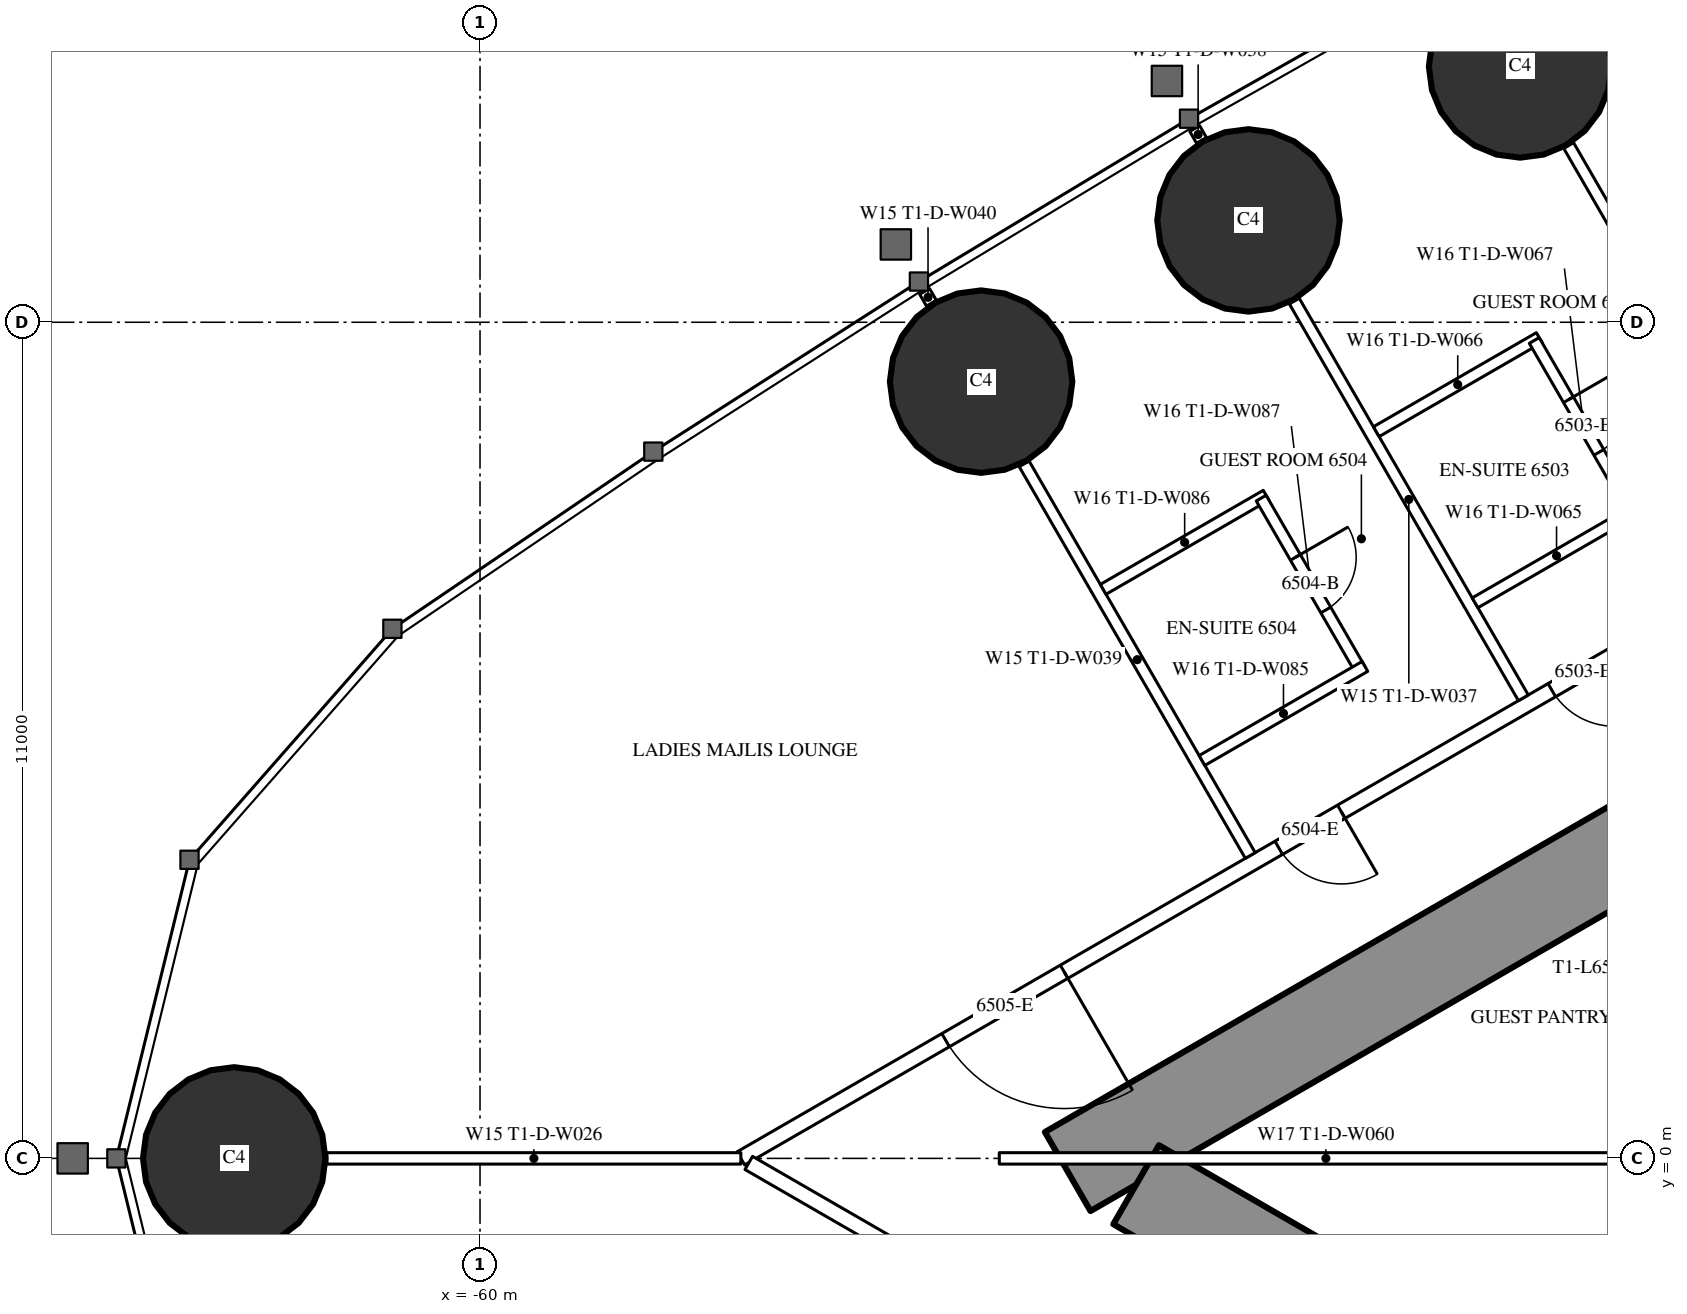
"""IFC4 building model, lengths in metres.
Left out: names, types, materials, properties, quantities, classifications, styles, units other than length and angle.
Written with IfcOpenShell. Run it as: python <this file> out.ifc"""

import sys

from ifc_helpers import new_model, si_unit, direction, frame, frame_2d, origin, origin_2d, place, context, subcontext, project, spatial, rectangle, circle, extrude, element, fill, save


model = new_model("IFC4")
c1 = context("Model", 3, precision=1e-05, world=origin(), true_north=direction((0.0, 1.0)))
c2 = subcontext(c1, "Body", "Model", "MODEL_VIEW")
j1 = project(units=[si_unit("LENGTHUNIT", "METRE"), si_unit("PLANEANGLEUNIT", "RADIAN")], contexts=[c1])
p1 = place(None, origin())
s1 = spatial("IfcSite", under=j1, at=p1, CompositionType="ELEMENT")
p2 = place(p1, origin())
s2 = spatial("IfcBuilding", under=s1, at=p2, CompositionType="ELEMENT")
p3 = place(p2, frame((0.0, 0.0, 244.1)))
s3 = spatial("IfcBuildingStorey", under=s2, at=p3, CompositionType="ELEMENT", Elevation=244.1)
for number, where, z_axis, x_axis in (
    (1, (-63.234, 0.0, 0.0), (0.0, 0.0, 1.0), (1.0, 0.0, 0.0)),
    (2, (-46.317, 14.365, 0.0), (0.0, 0.0, 1.0), (1.0, 0.0, 0.0)),
    (3, (-49.89, 12.34, 0.0), (0.0, 0.0, 1.0), (1.0, 0.0, 0.0)),
    (4, (-53.408, 10.219, 0.0), (0.0, 0.0, 1.0), (1.0, 0.0, 0.0)),
):
    element("IfcColumn", number, at=place(p3, frame(where, z_axis=z_axis, x_axis=x_axis)), inside=s3, PredefinedType="COLUMN", context=c2, shape_type="SweptSolid", body=[
        extrude(circle(Radius=1.2, at=origin_2d()), origin(), (0.0, 0.0, 1.0), 3.6),
    ])
p4 = place(p3, frame((-27.2, 14.3, 0.0), z_axis=(0.0, 0.0, 1.0), x_axis=(-0.866026593062, -0.499997940104, 0.0)))
e5 = element("IfcWall", 5, at=p4, inside=s3, PredefinedType="SHEAR", context=c2, shape_type="SweptSolid", body=[
    extrude(rectangle(XDim=28.946, YDim=1.2, at=frame_2d((14.473, 0.0))), origin(), (0.0, 0.0, 1.0), 3.6),
])
p5 = place(p4, frame((4.6, 0.0, 0.0)))
e6 = element("IfcOpeningElement", 6, at=p5, cuts=e5, PredefinedType="OPENING", context=c2, shape_type="SweptSolid", body=[
    extrude(rectangle(XDim=1.0, YDim=2.2, at=frame_2d((0.5, 1.1))), frame((0.0, 0.61, 0.0), z_axis=(0.0, -1.0, 0.0), x_axis=(1.0, 0.0, 0.0)), (0.0, 0.0, 1.0), 1.22),
])
p6 = place(p4, frame((13.395, 0.0, 0.0)))
e7 = element("IfcOpeningElement", 7, at=p6, cuts=e5, PredefinedType="OPENING", context=c2, shape_type="SweptSolid", body=[
    extrude(rectangle(XDim=1.8, YDim=2.2, at=frame_2d((0.9, 1.1))), frame((0.0, 0.61, 0.0), z_axis=(0.0, -1.0, 0.0), x_axis=(1.0, 0.0, 0.0)), (0.0, 0.0, 1.0), 1.22),
])
p7 = place(p3, frame((-27.2, -14.3, 0.0), z_axis=(0.0, 0.0, 1.0), x_axis=(-0.866024021859, 0.500002393557, 0.0)))
e8 = element("IfcWall", 8, at=p7, inside=s3, PredefinedType="SHEAR", context=c2, shape_type="SweptSolid", body=[
    extrude(rectangle(XDim=27.907, YDim=1.2, at=frame_2d((13.954, 0.0))), origin(), (0.0, 0.0, 1.0), 3.6),
])
p8 = place(p7, frame((4.6, 0.0, 0.0)))
e9 = element("IfcOpeningElement", 9, at=p8, cuts=e8, PredefinedType="OPENING", context=c2, shape_type="SweptSolid", body=[
    extrude(rectangle(XDim=1.0, YDim=2.2, at=frame_2d((0.5, 1.1))), frame((0.0, 0.61, 0.0), z_axis=(0.0, -1.0, 0.0), x_axis=(1.0, 0.0, 0.0)), (0.0, 0.0, 1.0), 1.22),
])
p9 = place(p7, frame((13.395, 0.0, 0.0)))
e10 = element("IfcOpeningElement", 10, at=p9, cuts=e8, PredefinedType="OPENING", context=c2, shape_type="SweptSolid", body=[
    extrude(rectangle(XDim=1.8, YDim=2.2, at=frame_2d((0.9, 1.1))), frame((0.0, 0.61, 0.0), z_axis=(0.0, -1.0, 0.0), x_axis=(1.0, 0.0, 0.0)), (0.0, 0.0, 1.0), 1.22),
])
p10 = place(p3, frame((-28.737, 16.068, 0.0), z_axis=(0.0, 0.0, 1.0), x_axis=(-0.866026057212, -0.499998868229, 0.0)))
e11 = element("IfcWall", 11, at=p10, inside=s3, PredefinedType="PARTITIONING", context=c2, shape_type="SweptSolid", body=[
    extrude(rectangle(XDim=32.137, YDim=0.2, at=frame_2d((16.068, 0.0))), origin(), (0.0, 0.0, 1.0), 3.35),
])
p11 = place(p10, frame((1.08, 0.0, 0.0)))
e12 = element("IfcOpeningElement", 12, at=p11, cuts=e11, PredefinedType="OPENING", context=c2, shape_type="SweptSolid", body=[
    extrude(rectangle(XDim=1.8, YDim=2.04, at=frame_2d((0.9, 1.02))), frame((0.0, 0.11, 0.0), z_axis=(0.0, -1.0, 0.0), x_axis=(1.0, 0.0, 0.0)), (0.0, 0.0, 1.0), 0.22),
])
p12 = place(p10, frame((6.86, 0.0, 0.0)))
e13 = element("IfcOpeningElement", 13, at=p12, cuts=e11, PredefinedType="OPENING", context=c2, shape_type="SweptSolid", body=[
    extrude(rectangle(XDim=1.0, YDim=2.2, at=frame_2d((0.5, 1.1))), frame((0.0, 0.11, 0.0), z_axis=(0.0, -1.0, 0.0), x_axis=(1.0, 0.0, 0.0)), (0.0, 0.0, 1.0), 0.22),
])
p13 = place(p10, frame((18.867, 0.0, 0.0)))
e14 = element("IfcOpeningElement", 14, at=p13, cuts=e11, PredefinedType="OPENING", context=c2, shape_type="SweptSolid", body=[
    extrude(rectangle(XDim=0.95, YDim=2.2, at=frame_2d((0.475, 1.1))), frame((0.0, 0.11, 0.0), z_axis=(0.0, -1.0, 0.0), x_axis=(1.0, 0.0, 0.0)), (0.0, 0.0, 1.0), 0.22),
])
p14 = place(p10, frame((23.015, 0.0, 0.0)))
e15 = element("IfcOpeningElement", 15, at=p14, cuts=e11, PredefinedType="OPENING", context=c2, shape_type="SweptSolid", body=[
    extrude(rectangle(XDim=0.95, YDim=2.2, at=frame_2d((0.475, 1.1))), frame((0.0, 0.11, 0.0), z_axis=(0.0, -1.0, 0.0), x_axis=(1.0, 0.0, 0.0)), (0.0, 0.0, 1.0), 0.22),
])
p15 = place(p10, frame((27.226, 0.0, 0.0)))
e16 = element("IfcOpeningElement", 16, at=p15, cuts=e11, PredefinedType="OPENING", context=c2, shape_type="SweptSolid", body=[
    extrude(rectangle(XDim=1.8, YDim=2.2, at=frame_2d((0.9, 1.1))), frame((0.0, 0.11, 0.0), z_axis=(0.0, -1.0, 0.0), x_axis=(1.0, 0.0, 0.0)), (0.0, 0.0, 1.0), 0.22),
])
p16 = place(p3, frame((-42.68, 8.134, 0.0), z_axis=(0.0, 0.0, 1.0), x_axis=(-0.499984479505, 0.866034364361, 0.0)))
e17 = element("IfcWall", 17, at=p16, inside=s3, PredefinedType="PARTITIONING", context=c2, shape_type="SweptSolid", body=[
    extrude(rectangle(XDim=5.995, YDim=0.15, at=frame_2d((2.998, 0.0))), origin(), (0.0, 0.0, 1.0), 2.45),
])
p17 = place(p3, frame((-46.274, 6.059, 0.0), z_axis=(0.0, 0.0, 1.0), x_axis=(-0.500020471368, 0.866013584312, 0.0)))
e18 = element("IfcWall", 18, at=p17, inside=s3, PredefinedType="PARTITIONING", context=c2, shape_type="SweptSolid", body=[
    extrude(rectangle(XDim=6.028, YDim=0.15, at=frame_2d((3.014, 0.0))), origin(), (0.0, 0.0, 1.0), 2.45),
])
p18 = place(p3, frame((-50.508, 13.392, 0.0), z_axis=(0.0, 0.0, 1.0), x_axis=(-0.499644091975, 0.866230789891, 0.0)))
e19 = element("IfcWall", 19, at=p18, inside=s3, PredefinedType="PARTITIONING", context=c2, shape_type="SweptSolid", body=[
    extrude(rectangle(XDim=0.18, YDim=0.15, at=frame_2d((0.09, 0.0))), origin(), (0.0, 0.0, 1.0), 2.45),
])
p19 = place(p3, frame((-49.866, 3.985, 0.0), z_axis=(0.0, 0.0, 1.0), x_axis=(-0.500000694566, 0.866025002776, 0.0)))
e20 = element("IfcWall", 20, at=p19, inside=s3, PredefinedType="PARTITIONING", context=c2, shape_type="SweptSolid", body=[
    extrude(rectangle(XDim=5.95, YDim=0.15, at=frame_2d((2.975, 0.0))), origin(), (0.0, 0.0, 1.0), 2.45),
])
p20 = place(p3, frame((-54.061, 11.25, 0.0), z_axis=(0.0, 0.0, 1.0), x_axis=(-0.500391173478, 0.865799441849, 0.0)))
e21 = element("IfcWall", 21, at=p20, inside=s3, PredefinedType="PARTITIONING", context=c2, shape_type="SweptSolid", body=[
    extrude(rectangle(XDim=0.179, YDim=0.15, at=frame_2d((0.089, 0.0))), origin(), (0.0, 0.0, 1.0), 2.45),
])
p21 = place(p3, frame((-56.568, 0.0, 0.0), z_axis=(0.0, 0.0, 1.0), x_axis=(-1.0, 0.0, 0.0)))
e22 = element("IfcWall", 22, at=p21, inside=s3, PredefinedType="PARTITIONING", context=c2, shape_type="SweptSolid", body=[
    extrude(rectangle(XDim=5.446, YDim=0.15, at=frame_2d((2.723, 0.0))), origin(), (0.0, 0.0, 1.0), 2.45),
])
p22 = place(p3, frame((-44.715, -6.844, 0.0), z_axis=(0.0, 0.0, 1.0), x_axis=(-0.866025261224, 0.500000246922, 0.0)))
e23 = element("IfcWall", 23, at=p22, inside=s3, PredefinedType="PARTITIONING", context=c2, shape_type="SweptSolid", body=[
    extrude(rectangle(XDim=13.567, YDim=0.2, at=frame_2d((6.783, 0.0))), origin(), (0.0, 0.0, 1.0), 3.35),
])
p23 = place(p22, frame((8.716, 0.0, 0.0)))
e24 = element("IfcOpeningElement", 24, at=p23, cuts=e23, PredefinedType="OPENING", context=c2, shape_type="SweptSolid", body=[
    extrude(rectangle(XDim=1.8, YDim=2.2, at=frame_2d((0.9, 1.1))), frame((0.0, 0.11, 0.0), z_axis=(0.0, -1.0, 0.0), x_axis=(1.0, 0.0, 0.0)), (0.0, 0.0, 1.0), 0.22),
])
p24 = place(p22, frame((4.565, 0.0, 0.0)))
e25 = element("IfcOpeningElement", 25, at=p24, cuts=e23, PredefinedType="OPENING", context=c2, shape_type="SweptSolid", body=[
    extrude(rectangle(XDim=0.95, YDim=2.2, at=frame_2d((0.475, 1.1))), frame((0.0, 0.11, 0.0), z_axis=(0.0, -1.0, 0.0), x_axis=(1.0, 0.0, 0.0)), (0.0, 0.0, 1.0), 0.22),
])
p25 = place(p22, frame((0.5, 0.0, 0.0)))
e26 = element("IfcOpeningElement", 26, at=p25, cuts=e23, PredefinedType="OPENING", context=c2, shape_type="SweptSolid", body=[
    extrude(rectangle(XDim=0.967, YDim=2.2, at=frame_2d((0.483, 1.1))), frame((0.0, 0.11, 0.0), z_axis=(0.0, -1.0, 0.0), x_axis=(1.0, 0.0, 0.0)), (0.0, 0.0, 1.0), 0.22),
])
p26 = place(p3, frame((-46.065, 10.798, 0.0), z_axis=(0.0, 0.0, 1.0), x_axis=(-0.866031185235, -0.4999899861, 0.0)))
e27 = element("IfcWall", 27, at=p26, inside=s3, PredefinedType="PARTITIONING", context=c2, shape_type="SweptSolid", body=[
    extrude(rectangle(XDim=2.475, YDim=0.15, at=frame_2d((1.238, 0.0))), origin(), (0.0, 0.0, 1.0), 3.35),
])
p27 = place(p3, frame((-44.83, 8.509, 0.0), z_axis=(0.0, 0.0, 1.0), x_axis=(-0.499936506574, 0.866062058628, 0.0)))
e28 = element("IfcWall", 28, at=p27, inside=s3, PredefinedType="PARTITIONING", context=c2, shape_type="SweptSolid", body=[
    extrude(rectangle(XDim=2.6, YDim=0.15, at=frame_2d((1.3, 0.0))), origin(), (0.0, 0.0, 1.0), 3.35),
])
p28 = place(p27, frame((0.9, 0.0, 0.0)))
e29 = element("IfcOpeningElement", 29, at=p28, cuts=e28, PredefinedType="OPENING", context=c2, shape_type="SweptSolid", body=[
    extrude(rectangle(XDim=0.8, YDim=2.2, at=frame_2d((0.4, 1.1))), frame((0.0, 0.085, 0.0), z_axis=(0.0, -1.0, 0.0), x_axis=(1.0, 0.0, 0.0)), (0.0, 0.0, 1.0), 0.17),
])
p29 = place(p3, frame((-44.765, 8.546, 0.0), z_axis=(0.0, 0.0, 1.0), x_axis=(-0.86604923931, -0.499958713387, 0.0)))
e30 = element("IfcWall", 30, at=p29, inside=s3, PredefinedType="PARTITIONING", context=c2, shape_type="SweptSolid", body=[
    extrude(rectangle(XDim=2.475, YDim=0.15, at=frame_2d((1.237, 0.0))), origin(), (0.0, 0.0, 1.0), 3.35),
])
p30 = place(p3, frame((-49.658, 8.724, 0.0), z_axis=(0.0, 0.0, 1.0), x_axis=(-0.866031185235, -0.4999899861, 0.0)))
e31 = element("IfcWall", 31, at=p30, inside=s3, PredefinedType="PARTITIONING", context=c2, shape_type="SweptSolid", body=[
    extrude(rectangle(XDim=2.475, YDim=0.15, at=frame_2d((1.238, 0.0))), origin(), (0.0, 0.0, 1.0), 3.35),
])
p31 = place(p3, frame((-48.423, 6.435, 0.0), z_axis=(0.0, 0.0, 1.0), x_axis=(-0.500006934395, 0.866021400173, 0.0)))
e32 = element("IfcWall", 32, at=p31, inside=s3, PredefinedType="PARTITIONING", context=c2, shape_type="SweptSolid", body=[
    extrude(rectangle(XDim=2.6, YDim=0.15, at=frame_2d((1.3, 0.0))), origin(), (0.0, 0.0, 1.0), 3.35),
])
p32 = place(p31, frame((0.9, 0.0, 0.0)))
e33 = element("IfcOpeningElement", 33, at=p32, cuts=e32, PredefinedType="OPENING", context=c2, shape_type="SweptSolid", body=[
    extrude(rectangle(XDim=0.8, YDim=2.2, at=frame_2d((0.4, 1.1))), frame((0.0, 0.085, 0.0), z_axis=(0.0, -1.0, 0.0), x_axis=(1.0, 0.0, 0.0)), (0.0, 0.0, 1.0), 0.17),
])
p33 = place(p3, frame((-48.358, 6.472, 0.0), z_axis=(0.0, 0.0, 1.0), x_axis=(-0.866073894602, -0.499916002032, 0.0)))
e34 = element("IfcWall", 34, at=p33, inside=s3, PredefinedType="PARTITIONING", context=c2, shape_type="SweptSolid", body=[
    extrude(rectangle(XDim=2.475, YDim=0.15, at=frame_2d((1.238, 0.0))), origin(), (0.0, 0.0, 1.0), 3.35),
])
p34 = place(p3, frame((-44.575, 0.0, 0.0), z_axis=(0.0, 0.0, 1.0), x_axis=(-1.0, 0.0, 0.0)))
e35 = element("IfcWall", 35, at=p34, inside=s3, PredefinedType="PARTITIONING", context=c2, shape_type="SweptSolid", body=[
    extrude(rectangle(XDim=8.593, YDim=0.15, at=frame_2d((4.297, 0.0))), origin(), (0.0, 0.0, 1.0), 2.45),
])
p35 = place(p28, origin())
e36 = element("IfcDoor", 36, at=p35, inside=s3, OperationType="SINGLE_SWING_RIGHT", PredefinedType="DOOR", context=c2, shape_type="SweptSolid", body=[
    extrude(rectangle(XDim=0.8, YDim=2.2, at=frame_2d((0.4, 1.1))), frame((0.0, 0.025, 0.0), z_axis=(0.0, -1.0, 0.0), x_axis=(1.0, 0.0, 0.0)), (0.0, 0.0, 1.0), 0.05),
])
fill(e29, e36)
p36 = place(p13, origin())
e37 = element("IfcDoor", 37, at=p36, inside=s3, OperationType="SINGLE_SWING_LEFT", PredefinedType="DOOR", context=c2, shape_type="SweptSolid", body=[
    extrude(rectangle(XDim=0.95, YDim=2.2, at=frame_2d((0.475, 1.1))), frame((0.0, 0.025, 0.0), z_axis=(0.0, -1.0, 0.0), x_axis=(1.0, 0.0, 0.0)), (0.0, 0.0, 1.0), 0.05),
])
fill(e14, e37)
p37 = place(p32, origin())
e38 = element("IfcDoor", 38, at=p37, inside=s3, OperationType="SINGLE_SWING_RIGHT", PredefinedType="DOOR", context=c2, shape_type="SweptSolid", body=[
    extrude(rectangle(XDim=0.8, YDim=2.2, at=frame_2d((0.4, 1.1))), frame((0.0, 0.025, 0.0), z_axis=(0.0, -1.0, 0.0), x_axis=(1.0, 0.0, 0.0)), (0.0, 0.0, 1.0), 0.05),
])
fill(e33, e38)
p38 = place(p14, origin())
e39 = element("IfcDoor", 39, at=p38, inside=s3, OperationType="SINGLE_SWING_LEFT", PredefinedType="DOOR", context=c2, shape_type="SweptSolid", body=[
    extrude(rectangle(XDim=0.95, YDim=2.2, at=frame_2d((0.475, 1.1))), frame((0.0, 0.025, 0.0), z_axis=(0.0, -1.0, 0.0), x_axis=(1.0, 0.0, 0.0)), (0.0, 0.0, 1.0), 0.05),
])
fill(e15, e39)
p39 = place(p15, origin())
e40 = element("IfcDoor", 40, at=p39, inside=s3, OperationType="DOUBLE_DOOR_SINGLE_SWING", PredefinedType="DOOR", context=c2, shape_type="SweptSolid", body=[
    extrude(rectangle(XDim=1.8, YDim=2.2, at=frame_2d((0.9, 1.1))), frame((0.0, 0.025, 0.0), z_axis=(0.0, -1.0, 0.0), x_axis=(1.0, 0.0, 0.0)), (0.0, 0.0, 1.0), 0.05),
])
fill(e16, e40)
save(model, sys.argv[1])
